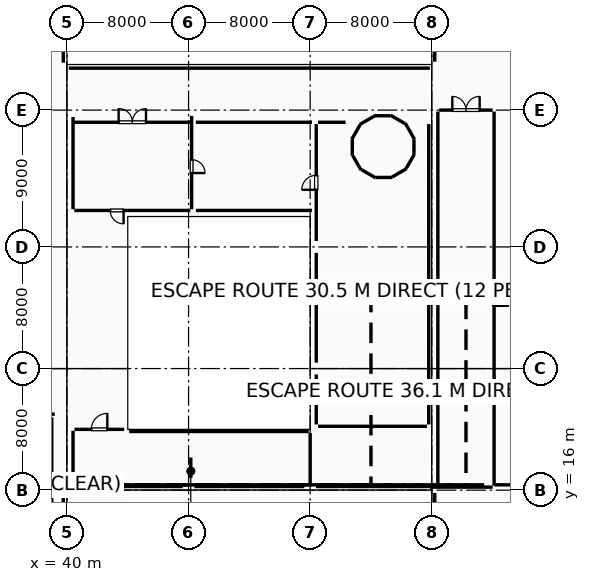
"""IFC4 building model, lengths in metres.
Left out: names, types, materials, properties, quantities, classifications, styles, units other than length and angle.
Written with IfcOpenShell. Run it as: python <this file> out.ifc"""

import sys

from ifc_helpers import new_model, si_unit, direction, frame, frame_2d, origin, origin_2d, place, context, subcontext, project, spatial, rectangle, extrude, element, fill, save


model = new_model("IFC4")
c1 = context("Model", 3, precision=1e-05, world=origin(), true_north=direction((0.0, 1.0)))
c2 = subcontext(c1, "Body", "Model", "MODEL_VIEW")
j1 = project(units=[si_unit("LENGTHUNIT", "METRE"), si_unit("PLANEANGLEUNIT", "RADIAN")], contexts=[c1])
p1 = place(None, origin())
s1 = spatial("IfcSite", under=j1, at=p1, CompositionType="ELEMENT")
p2 = place(p1, origin())
s2 = spatial("IfcBuilding", under=s1, at=p2, CompositionType="ELEMENT")
p3 = place(p2, frame((0.0, 0.0, 15.0)))
s3 = spatial("IfcBuildingStorey", under=s2, at=p3, CompositionType="ELEMENT", Elevation=15.0)
for number, where, z_axis, x_axis in (
    (1, (40.0, 16.0, 0.0), (0.0, 0.0, 1.0), (1.0, 0.0, 0.0)),
    (2, (40.0, 24.0, 0.0), (0.0, 0.0, 1.0), (1.0, 0.0, 0.0)),
    (3, (40.0, 32.0, 0.0), (0.0, 0.0, 1.0), (1.0, 0.0, 0.0)),
    (4, (40.0, 41.0, 0.0), (0.0, 0.0, 1.0), (1.0, 0.0, 0.0)),
):
    element("IfcColumn", number, at=place(p3, frame(where, z_axis=z_axis, x_axis=x_axis)), inside=s3, PredefinedType="COLUMN", context=c2, shape_type="SweptSolid", body=[
        extrude(rectangle(XDim=0.9, YDim=0.9, at=origin_2d()), origin(), (0.0, 0.0, 1.0), 4.8),
    ])
for number, where, z_axis, x_axis in (
    (5, (48.0, 16.0, 0.0), (0.0, 0.0, 1.0), (1.0, 0.0, 0.0)),
    (6, (48.0, 41.0, 0.0), (0.0, 0.0, 1.0), (1.0, 0.0, 0.0)),
    (7, (56.0, 16.0, 0.0), (0.0, 0.0, 1.0), (1.0, 0.0, 0.0)),
    (8, (56.0, 24.0, 0.0), (0.0, 0.0, 1.0), (1.0, 0.0, 0.0)),
    (9, (56.0, 32.0, 0.0), (0.0, 0.0, 1.0), (1.0, 0.0, 0.0)),
    (10, (56.0, 41.0, 0.0), (0.0, 0.0, 1.0), (1.0, 0.0, 0.0)),
):
    element("IfcColumn", number, at=place(p3, frame(where, z_axis=z_axis, x_axis=x_axis)), inside=s3, PredefinedType="COLUMN", context=c2, shape_type="SweptSolid", body=[
        extrude(rectangle(XDim=0.75, YDim=0.75, at=origin_2d()), origin(), (0.0, 0.0, 1.0), 4.76),
    ])
p4 = place(p3, frame((64.195, 10.185, 0.0), z_axis=(0.0, 0.0, 1.0), x_axis=(0.0, 1.0, 0.0)))
e11 = element("IfcWall", 11, at=p4, inside=s3, PredefinedType="STANDARD", context=c2, shape_type="SweptSolid", body=[
    extrude(rectangle(XDim=5.63, YDim=0.35, at=frame_2d((2.815, 0.0))), origin(), (0.0, 0.0, 1.0), 3.735),
])
p5 = place(p3, frame((63.88, 16.24, 0.0), z_axis=(0.0, 0.0, 1.0), x_axis=(-1.0, 0.0, 0.0)))
e12 = element("IfcWall", 12, at=p5, inside=s3, PredefinedType="PARAPET", context=c2, shape_type="SweptSolid", body=[
    extrude(rectangle(XDim=7.495, YDim=0.18, at=frame_2d((3.748, 0.0))), origin(), (0.0, 0.0, 1.0), 0.88),
])
p6 = place(p3, frame((55.615, 16.24, 0.0), z_axis=(0.0, 0.0, 1.0), x_axis=(-1.0, 0.0, 0.0)))
e13 = element("IfcWall", 13, at=p6, inside=s3, PredefinedType="PARAPET", context=c2, shape_type="SweptSolid", body=[
    extrude(rectangle(XDim=7.23, YDim=0.18, at=frame_2d((3.615, 0.0))), origin(), (0.0, 0.0, 1.0), 0.88),
])
p7 = place(p3, frame((47.615, 16.24, 0.0), z_axis=(0.0, 0.0, 1.0), x_axis=(-1.0, 0.0, 0.0)))
e14 = element("IfcWall", 14, at=p7, inside=s3, PredefinedType="PARAPET", context=c2, shape_type="SweptSolid", body=[
    extrude(rectangle(XDim=7.155, YDim=0.18, at=frame_2d((3.578, 0.0))), origin(), (0.0, 0.0, 1.0), 0.88),
])
p8 = place(p3, frame((39.76, 15.54, 0.0), z_axis=(0.0, 0.0, 1.0), x_axis=(0.0, -1.0, 0.0)))
e15 = element("IfcWall", 15, at=p8, inside=s3, PredefinedType="PARAPET", context=c2, shape_type="SweptSolid", body=[
    extrude(rectangle(XDim=7.08, YDim=0.18, at=frame_2d((3.54, 0.0))), origin(), (0.0, 0.0, 1.0), 0.88),
])
p9 = place(p3, frame((39.76, 49.54, 0.0), z_axis=(0.0, 0.0, 1.0), x_axis=(0.0, -1.0, 0.0)))
e16 = element("IfcWall", 16, at=p9, inside=s3, PredefinedType="PARAPET", context=c2, shape_type="SweptSolid", body=[
    extrude(rectangle(XDim=5.42, YDim=0.18, at=frame_2d((2.71, 0.0))), origin(), (0.0, 0.0, 1.0), 0.88),
])
p10 = place(p3, frame((40.12, 43.76, 0.0), z_axis=(0.0, 0.0, 1.0), x_axis=(1.0, 0.0, 0.0)))
e17 = element("IfcWall", 17, at=p10, inside=s3, PredefinedType="PARAPET", context=c2, shape_type="SweptSolid", body=[
    extrude(rectangle(XDim=23.76, YDim=0.18, at=frame_2d((11.88, 0.0))), origin(), (0.0, 0.0, 1.0), 0.88),
])
p11 = place(p3, frame((64.195, 44.185, 0.0), z_axis=(0.0, 0.0, 1.0), x_axis=(0.0, 1.0, 0.0)))
e18 = element("IfcWall", 18, at=p11, inside=s3, PredefinedType="STANDARD", context=c2, shape_type="SweptSolid", body=[
    extrude(rectangle(XDim=2.582, YDim=0.35, at=frame_2d((1.291, 0.0))), origin(), (0.0, 0.0, 1.0), 3.735),
])
p12 = place(p3, frame((39.2, 21.0, 0.0), z_axis=(0.0, 0.0, 1.0), x_axis=(-1.0, 0.0, 0.0)))
e19 = element("IfcWall", 19, at=p12, inside=s3, PredefinedType="SHEAR", context=c2, shape_type="SweptSolid", body=[
    extrude(rectangle(XDim=8.4, YDim=0.4, at=frame_2d((4.2, 0.0))), origin(), (0.0, 0.0, 1.0), 4.55),
])
p13 = place(p3, frame((39.0, 12.41, 0.0), z_axis=(0.0, 0.0, 1.0), x_axis=(0.0, 1.0, 0.0)))
e20 = element("IfcWall", 20, at=p13, inside=s3, PredefinedType="SHEAR", context=c2, shape_type="SweptSolid", body=[
    extrude(rectangle(XDim=8.38, YDim=0.4, at=frame_2d((4.19, 0.0))), origin(), (0.0, 0.0, 1.0), 4.55),
])
p14 = place(p3, frame((62.861, 39.086, 0.0), z_axis=(0.0, 0.0, 1.0), x_axis=(-0.499930512259, 0.866065518833, 0.0)))
e21 = element("IfcWall", 21, at=p14, inside=s3, PredefinedType="SHEAR", context=c2, shape_type="SweptSolid", body=[
    extrude(rectangle(XDim=1.219, YDim=0.35, at=frame_2d((0.609, 0.0))), origin(), (0.0, 0.0, 1.0), 4.58),
])
for number, where, z_axis, x_axis in (
    (22, (62.233, 40.115, 0.0), (0.0, 0.0, 1.0), (-0.866, 0.5, 0.0)),
    (23, (61.283, 40.628, 0.0), (0.0, 0.0, 1.0), (-1.0, 0.0, 0.0)),
    (24, (60.205, 40.598, 0.0), (0.0, 0.0, 1.0), (-0.866, -0.5, 0.0)),
    (25, (59.285, 40.033, 0.0), (0.0, 0.0, 1.0), (-0.5, -0.866, 0.0)),
    (26, (58.771, 39.083, 0.0), (0.0, 0.0, 1.0), (0.0, -1.0, 0.0)),
    (27, (58.802, 38.004, 0.0), (0.0, 0.0, 1.0), (0.5, -0.866, 0.0)),
):
    element("IfcWall", number, at=place(p3, frame(where, z_axis=z_axis, x_axis=x_axis)), inside=s3, PredefinedType="SHEAR", context=c2, shape_type="SweptSolid", body=[
        extrude(rectangle(XDim=1.093, YDim=0.35, at=frame_2d((0.546, 0.0))), origin(), (0.0, 0.0, 1.0), 4.58),
    ])
p15 = place(p3, frame((59.367, 37.085, 0.0), z_axis=(0.0, 0.0, 1.0), x_axis=(0.866021955858, -0.500005971936, 0.0)))
e28 = element("IfcWall", 28, at=p15, inside=s3, PredefinedType="SHEAR", context=c2, shape_type="SweptSolid", body=[
    extrude(rectangle(XDim=1.093, YDim=0.35, at=frame_2d((0.547, 0.0))), origin(), (0.0, 0.0, 1.0), 4.58),
])
for number, where, z_axis, x_axis in (
    (29, (60.316, 36.572, 0.0), (0.0, 0.0, 1.0), (1.0, 0.0, 0.0)),
    (30, (61.396, 36.602, 0.0), (0.0, 0.0, 1.0), (0.866, 0.5, 0.0)),
    (31, (62.315, 37.167, 0.0), (0.0, 0.0, 1.0), (0.5, 0.866, 0.0)),
):
    element("IfcWall", number, at=place(p3, frame(where, z_axis=z_axis, x_axis=x_axis)), inside=s3, PredefinedType="SHEAR", context=c2, shape_type="SweptSolid", body=[
        extrude(rectangle(XDim=1.093, YDim=0.35, at=frame_2d((0.546, 0.0))), origin(), (0.0, 0.0, 1.0), 4.58),
    ])
p16 = place(p3, frame((62.828, 38.116, 0.0), z_axis=(0.0, 0.0, 1.0), x_axis=(0.0, 1.0, 0.0)))
e32 = element("IfcWall", 32, at=p16, inside=s3, PredefinedType="SHEAR", context=c2, shape_type="SweptSolid", body=[
    extrude(rectangle(XDim=0.967, YDim=0.35, at=frame_2d((0.483, 0.0))), origin(), (0.0, 0.0, 1.0), 4.58),
])
p17 = place(p3, frame((68.1, 40.905, 0.0), z_axis=(0.0, 0.0, 1.0), x_axis=(0.0, -1.0, 0.0)))
e33 = element("IfcWall", 33, at=p17, inside=s3, PredefinedType="PARTITIONING", context=c2, shape_type="SweptSolid", body=[
    extrude(rectangle(XDim=24.61, YDim=0.15, at=frame_2d((12.305, 0.0))), origin(), (0.0, 0.0, 1.0), 4.54),
])
p18 = place(p17, frame((11.83, 0.0, 0.0)))
e34 = element("IfcOpeningElement", 34, at=p18, cuts=e33, PredefinedType="OPENING", context=c2, shape_type="SweptSolid", body=[
    extrude(rectangle(XDim=0.95, YDim=2.15, at=frame_2d((0.475, 1.075))), frame((0.0, 0.085, 0.0), z_axis=(0.0, -1.0, 0.0), x_axis=(1.0, 0.0, 0.0)), (0.0, 0.0, 1.0), 0.17),
])
p19 = place(p3, frame((68.005, 16.2, 0.0), z_axis=(0.0, 0.0, 1.0), x_axis=(-1.0, 0.0, 0.0)))
e35 = element("IfcWall", 35, at=p19, inside=s3, PredefinedType="PARTITIONING", context=c2, shape_type="SweptSolid", body=[
    extrude(rectangle(XDim=4.121, YDim=0.15, at=frame_2d((2.061, 0.0))), origin(), (0.0, 0.0, 1.0), 3.93),
])
p20 = place(p3, frame((64.4, 16.295, 0.0), z_axis=(0.0, 0.0, 1.0), x_axis=(0.0, 1.0, 0.0)))
e36 = element("IfcWall", 36, at=p20, inside=s3, PredefinedType="PARTITIONING", context=c2, shape_type="SweptSolid", body=[
    extrude(rectangle(XDim=24.61, YDim=0.15, at=frame_2d((12.305, 0.0))), origin(), (0.0, 0.0, 1.0), 3.73),
])
p21 = place(p3, frame((64.495, 41.0, 0.0), z_axis=(0.0, 0.0, 1.0), x_axis=(1.0, 0.0, 0.0)))
e37 = element("IfcWall", 37, at=p21, inside=s3, PredefinedType="PARTITIONING", context=c2, shape_type="SweptSolid", body=[
    extrude(rectangle(XDim=3.51, YDim=0.15, at=frame_2d((1.755, 0.0))), origin(), (0.0, 0.0, 1.0), 3.98),
])
p22 = place(p21, frame((0.855, 0.0, 0.0)))
e38 = element("IfcOpeningElement", 38, at=p22, cuts=e37, PredefinedType="OPENING", context=c2, shape_type="SweptSolid", body=[
    extrude(rectangle(XDim=1.8, YDim=2.15, at=frame_2d((0.9, 1.075))), frame((0.0, 0.085, 0.0), z_axis=(0.0, -1.0, 0.0), x_axis=(1.0, 0.0, 0.0)), (0.0, 0.0, 1.0), 0.17),
])
p23 = place(p3, frame((40.4, 16.495, 0.0), z_axis=(0.0, 0.0, 1.0), x_axis=(0.0, 1.0, 0.0)))
e39 = element("IfcWall", 39, at=p23, inside=s3, PredefinedType="PARTITIONING", context=c2, shape_type="SweptSolid", body=[
    extrude(rectangle(XDim=3.41, YDim=0.15, at=frame_2d((1.705, 0.0))), origin(), (0.0, 0.0, 1.0), 3.68),
])
p24 = place(p3, frame((40.495, 20.0, 0.0), z_axis=(0.0, 0.0, 1.0), x_axis=(1.0, 0.0, 0.0)))
e40 = element("IfcWall", 40, at=p24, inside=s3, PredefinedType="PARTITIONING", context=c2, shape_type="SweptSolid", body=[
    extrude(rectangle(XDim=3.27, YDim=0.15, at=frame_2d((1.635, 0.0))), origin(), (0.0, 0.0, 1.0), 4.57),
])
p25 = place(p24, frame((1.11, 0.0, 0.0)))
e41 = element("IfcOpeningElement", 41, at=p25, cuts=e40, PredefinedType="OPENING", context=c2, shape_type="SweptSolid", body=[
    extrude(rectangle(XDim=1.05, YDim=2.15, at=frame_2d((0.525, 1.075))), frame((0.0, 0.085, 0.0), z_axis=(0.0, -1.0, 0.0), x_axis=(1.0, 0.0, 0.0)), (0.0, 0.0, 1.0), 0.17),
])
p26 = place(p3, frame((44.095, 19.86, 0.0), z_axis=(0.0, 0.0, 1.0), x_axis=(1.0, 0.0, 0.0)))
e42 = element("IfcWall", 42, at=p26, inside=s3, PredefinedType="PARTITIONING", context=c2, shape_type="SweptSolid", body=[
    extrude(rectangle(XDim=11.81, YDim=0.15, at=frame_2d((5.905, 0.0))), origin(), (0.0, 0.0, 1.0), 4.57),
])
p27 = place(p3, frame((56.0, 19.765, 0.0), z_axis=(0.0, 0.0, 1.0), x_axis=(0.0, -1.0, 0.0)))
e43 = element("IfcWall", 43, at=p27, inside=s3, PredefinedType="PARTITIONING", context=c2, shape_type="SweptSolid", body=[
    extrude(rectangle(XDim=3.386, YDim=0.15, at=frame_2d((1.693, 0.0))), origin(), (0.0, 0.0, 1.0), 4.18),
])
p28 = place(p3, frame((56.52, 40.2, 0.0), z_axis=(0.0, 0.0, 1.0), x_axis=(1.0, 0.0, 0.0)))
e44 = element("IfcWall", 44, at=p28, inside=s3, PredefinedType="PARTITIONING", context=c2, shape_type="SweptSolid", body=[
    extrude(rectangle(XDim=1.81, YDim=0.2, at=frame_2d((0.905, 0.0))), origin(), (0.0, 0.0, 1.0), 4.57),
])
p29 = place(p3, frame((63.8, 40.08, 0.0), z_axis=(0.0, 0.0, 1.0), x_axis=(0.0, -1.0, 0.0)))
e45 = element("IfcWall", 45, at=p29, inside=s3, PredefinedType="PARTITIONING", context=c2, shape_type="SweptSolid", body=[
    extrude(rectangle(XDim=19.76, YDim=0.2, at=frame_2d((9.88, 0.0))), origin(), (0.0, 0.0, 1.0), 3.73),
])
p30 = place(p3, frame((63.68, 20.2, 0.0), z_axis=(0.0, 0.0, 1.0), x_axis=(-1.0, 0.0, 0.0)))
e46 = element("IfcWall", 46, at=p30, inside=s3, PredefinedType="PARTITIONING", context=c2, shape_type="SweptSolid", body=[
    extrude(rectangle(XDim=7.16, YDim=0.2, at=frame_2d((3.58, 0.0))), origin(), (0.0, 0.0, 1.0), 4.57),
])
p31 = place(p3, frame((56.4, 20.32, 0.0), z_axis=(0.0, 0.0, 1.0), x_axis=(0.0, 1.0, 0.0)))
e47 = element("IfcWall", 47, at=p31, inside=s3, PredefinedType="PARTITIONING", context=c2, shape_type="SweptSolid", body=[
    extrude(rectangle(XDim=3.29, YDim=0.2, at=frame_2d((1.645, 0.0))), origin(), (0.0, 0.0, 1.0), 4.57),
])
p32 = place(p3, frame((56.4, 24.39, 0.0), z_axis=(0.0, 0.0, 1.0), x_axis=(0.0, 1.0, 0.0)))
e48 = element("IfcWall", 48, at=p32, inside=s3, PredefinedType="PARTITIONING", context=c2, shape_type="SweptSolid", body=[
    extrude(rectangle(XDim=7.22, YDim=0.2, at=frame_2d((3.61, 0.0))), origin(), (0.0, 0.0, 1.0), 4.57),
])
p33 = place(p3, frame((56.4, 32.39, 0.0), z_axis=(0.0, 0.0, 1.0), x_axis=(0.0, 1.0, 0.0)))
e49 = element("IfcWall", 49, at=p33, inside=s3, PredefinedType="PARTITIONING", context=c2, shape_type="SweptSolid", body=[
    extrude(rectangle(XDim=7.69, YDim=0.2, at=frame_2d((3.845, 0.0))), origin(), (0.0, 0.0, 1.0), 4.57),
])
p34 = place(p33, frame((3.37, 0.0, 0.0)))
e50 = element("IfcOpeningElement", 50, at=p34, cuts=e49, PredefinedType="OPENING", context=c2, shape_type="SweptSolid", body=[
    extrude(rectangle(XDim=0.95, YDim=2.15, at=frame_2d((0.475, 1.075))), frame((0.0, 0.11, 0.0), z_axis=(0.0, -1.0, 0.0), x_axis=(1.0, 0.0, 0.0)), (0.0, 0.0, 1.0), 0.22),
])
p35 = place(p3, frame((40.48, 40.2, 0.0), z_axis=(0.0, 0.0, 1.0), x_axis=(1.0, 0.0, 0.0)))
e51 = element("IfcWall", 51, at=p35, inside=s3, PredefinedType="PARTITIONING", context=c2, shape_type="SweptSolid", body=[
    extrude(rectangle(XDim=7.64, YDim=0.12, at=frame_2d((3.82, 0.0))), origin(), (0.0, 0.0, 1.0), 4.57),
])
p36 = place(p35, frame((2.92, 0.0, 0.0)))
e52 = element("IfcOpeningElement", 52, at=p36, cuts=e51, PredefinedType="OPENING", context=c2, shape_type="SweptSolid", body=[
    extrude(rectangle(XDim=1.8, YDim=2.15, at=frame_2d((0.9, 1.075))), frame((0.0, 0.07, 0.0), z_axis=(0.0, -1.0, 0.0), x_axis=(1.0, 0.0, 0.0)), (0.0, 0.0, 1.0), 0.14),
])
p37 = place(p3, frame((48.2, 40.621, 0.0), z_axis=(0.0, 0.0, 1.0), x_axis=(0.0, -1.0, 0.0)))
e53 = element("IfcWall", 53, at=p37, inside=s3, PredefinedType="PARTITIONING", context=c2, shape_type="SweptSolid", body=[
    extrude(rectangle(XDim=6.141, YDim=0.12, at=frame_2d((3.071, 0.0))), origin(), (0.0, 0.0, 1.0), 4.57),
])
p38 = place(p37, frame((2.881, 0.0, 0.0)))
e54 = element("IfcOpeningElement", 54, at=p38, cuts=e53, PredefinedType="OPENING", context=c2, shape_type="SweptSolid", body=[
    extrude(rectangle(XDim=0.88, YDim=2.1, at=frame_2d((0.44, 1.05))), frame((0.0, 0.07, 0.0), z_axis=(0.0, -1.0, 0.0), x_axis=(1.0, 0.0, 0.0)), (0.0, 0.0, 1.0), 0.14),
])
p39 = place(p3, frame((48.12, 34.4, 0.0), z_axis=(0.0, 0.0, 1.0), x_axis=(-1.0, 0.0, 0.0)))
e55 = element("IfcWall", 55, at=p39, inside=s3, PredefinedType="PARTITIONING", context=c2, shape_type="SweptSolid", body=[
    extrude(rectangle(XDim=7.64, YDim=0.12, at=frame_2d((3.82, 0.0))), origin(), (0.0, 0.0, 1.0), 4.57),
])
p40 = place(p39, frame((4.394, 0.0, 0.0)))
e56 = element("IfcOpeningElement", 56, at=p40, cuts=e55, PredefinedType="OPENING", context=c2, shape_type="SweptSolid", body=[
    extrude(rectangle(XDim=0.88, YDim=2.1, at=frame_2d((0.44, 1.05))), frame((0.0, 0.07, 0.0), z_axis=(0.0, -1.0, 0.0), x_axis=(1.0, 0.0, 0.0)), (0.0, 0.0, 1.0), 0.14),
])
p41 = place(p3, frame((40.4, 34.48, 0.0), z_axis=(0.0, 0.0, 1.0), x_axis=(0.0, 1.0, 0.0)))
e57 = element("IfcWall", 57, at=p41, inside=s3, PredefinedType="PARTITIONING", context=c2, shape_type="SweptSolid", body=[
    extrude(rectangle(XDim=6.066, YDim=0.12, at=frame_2d((3.033, 0.0))), origin(), (0.0, 0.0, 1.0), 4.57),
])
for number, where, z_axis, x_axis in (
    (58, (48.48, 40.2, 0.0), (0.0, 0.0, 1.0), (1.0, 0.0, 0.0)),
    (59, (56.12, 34.4, 0.0), (0.0, 0.0, 1.0), (-1.0, 0.0, 0.0)),
):
    element("IfcWall", number, at=place(p3, frame(where, z_axis=z_axis, x_axis=x_axis)), inside=s3, PredefinedType="PARTITIONING", context=c2, shape_type="SweptSolid", body=[
        extrude(rectangle(XDim=7.64, YDim=0.12, at=frame_2d((3.82, 0.0))), origin(), (0.0, 0.0, 1.0), 4.57),
    ])
p42 = place(p18, origin())
e60 = element("IfcDoor", 60, at=p42, inside=s3, OperationType="SINGLE_SWING_RIGHT", PredefinedType="DOOR", context=c2, shape_type="SweptSolid", body=[
    extrude(rectangle(XDim=0.95, YDim=2.15, at=frame_2d((0.475, 1.075))), frame((0.0, 0.025, 0.0), z_axis=(0.0, -1.0, 0.0), x_axis=(1.0, 0.0, 0.0)), (0.0, 0.0, 1.0), 0.05),
])
fill(e34, e60)
p43 = place(p25, origin())
e61 = element("IfcDoor", 61, at=p43, inside=s3, OperationType="SINGLE_SWING_RIGHT", PredefinedType="DOOR", context=c2, shape_type="SweptSolid", body=[
    extrude(rectangle(XDim=1.05, YDim=2.15, at=frame_2d((0.525, 1.075))), frame((0.0, 0.025, 0.0), z_axis=(0.0, -1.0, 0.0), x_axis=(1.0, 0.0, 0.0)), (0.0, 0.0, 1.0), 0.05),
])
fill(e41, e61)
p44 = place(p34, origin())
e62 = element("IfcDoor", 62, at=p44, inside=s3, OperationType="SINGLE_SWING_LEFT", PredefinedType="DOOR", context=c2, shape_type="SweptSolid", body=[
    extrude(rectangle(XDim=0.95, YDim=2.15, at=frame_2d((0.475, 1.075))), frame((0.0, 0.025, 0.0), z_axis=(0.0, -1.0, 0.0), x_axis=(1.0, 0.0, 0.0)), (0.0, 0.0, 1.0), 0.05),
])
fill(e50, e62)
p45 = place(p40, origin())
e63 = element("IfcDoor", 63, at=p45, inside=s3, OperationType="SINGLE_SWING_LEFT", PredefinedType="DOOR", context=c2, shape_type="SweptSolid", body=[
    extrude(rectangle(XDim=0.88, YDim=2.1, at=frame_2d((0.44, 1.05))), frame((0.0, 0.025, 0.0), z_axis=(0.0, -1.0, 0.0), x_axis=(1.0, 0.0, 0.0)), (0.0, 0.0, 1.0), 0.05),
])
fill(e56, e63)
p46 = place(p38, origin())
e64 = element("IfcDoor", 64, at=p46, inside=s3, OperationType="SINGLE_SWING_RIGHT", PredefinedType="DOOR", context=c2, shape_type="SweptSolid", body=[
    extrude(rectangle(XDim=0.88, YDim=2.1, at=frame_2d((0.44, 1.05))), frame((0.0, 0.025, 0.0), z_axis=(0.0, -1.0, 0.0), x_axis=(1.0, 0.0, 0.0)), (0.0, 0.0, 1.0), 0.05),
])
fill(e54, e64)
p47 = place(p22, origin())
e65 = element("IfcDoor", 65, at=p47, inside=s3, OperationType="DOUBLE_DOOR_SINGLE_SWING", PredefinedType="DOOR", context=c2, shape_type="SweptSolid", body=[
    extrude(rectangle(XDim=1.8, YDim=2.15, at=frame_2d((0.9, 1.075))), frame((0.0, 0.025, 0.0), z_axis=(0.0, -1.0, 0.0), x_axis=(1.0, 0.0, 0.0)), (0.0, 0.0, 1.0), 0.05),
])
fill(e38, e65)
p48 = place(p36, origin())
e66 = element("IfcDoor", 66, at=p48, inside=s3, OperationType="DOUBLE_DOOR_SINGLE_SWING", PredefinedType="DOOR", context=c2, shape_type="SweptSolid", body=[
    extrude(rectangle(XDim=1.8, YDim=2.15, at=frame_2d((0.9, 1.075))), frame((0.0, 0.025, 0.0), z_axis=(0.0, -1.0, 0.0), x_axis=(1.0, 0.0, 0.0)), (0.0, 0.0, 1.0), 0.05),
])
fill(e52, e66)
save(model, sys.argv[1])
